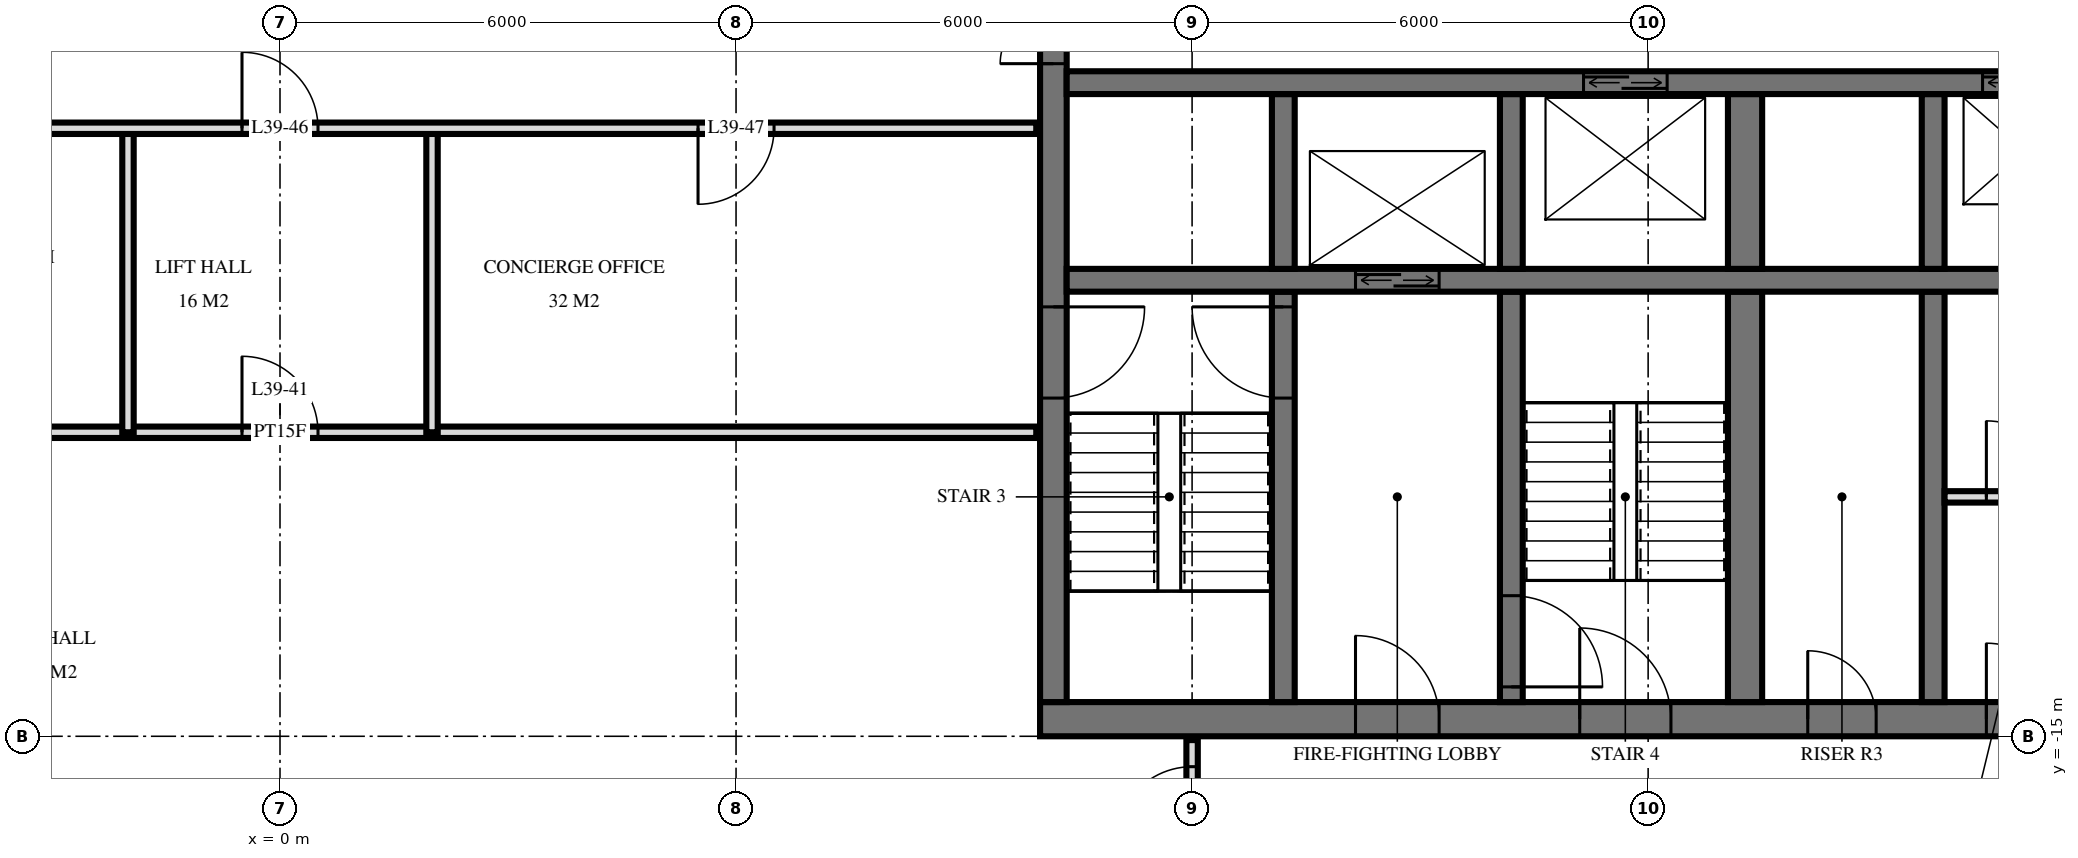
"""IFC4 building model, lengths in metres.
Left out: names, types, materials, properties, quantities, classifications, styles, units other than length and angle.
Written with IfcOpenShell. Run it as: python <this file> out.ifc"""

import sys

from ifc_helpers import new_model, si_unit, direction, frame, frame_2d, origin, place, context, subcontext, project, spatial, rectangle, extrude, element, fill, save


model = new_model("IFC4")
c1 = context("Model", 3, precision=1e-05, world=origin(), true_north=direction((0.0, 1.0)))
c2 = subcontext(c1, "Body", "Model", "MODEL_VIEW")
j1 = project(units=[si_unit("LENGTHUNIT", "METRE"), si_unit("PLANEANGLEUNIT", "RADIAN")], contexts=[c1])
p1 = place(None, origin())
s1 = spatial("IfcSite", under=j1, at=p1, CompositionType="ELEMENT")
p2 = place(p1, origin())
s2 = spatial("IfcBuilding", under=s1, at=p2, CompositionType="ELEMENT")
p3 = place(p2, frame((0.0, 0.0, 152.4)))
s3 = spatial("IfcBuildingStorey", under=s2, at=p3, CompositionType="ELEMENT", Elevation=152.4)
p4 = place(p3, frame((10.0, -14.775, 0.0), z_axis=(0.0, 0.0, 1.0), x_axis=(1.0, 0.0, 0.0)))
e1 = element("IfcWall", 1, at=p4, inside=s3, PredefinedType="SHEAR", context=c2, shape_type="SweptSolid", body=[
    extrude(rectangle(XDim=14.5, YDim=0.45, at=frame_2d((7.25, 0.0))), origin(), (0.0, 0.0, 1.0), 3.6),
])
p5 = place(p4, frame((7.1, 0.0, 0.0)))
e2 = element("IfcOpeningElement", 2, at=p5, cuts=e1, PredefinedType="OPENING", context=c2, shape_type="SweptSolid", body=[
    extrude(rectangle(XDim=1.2, YDim=2.1, at=frame_2d((0.6, 1.05))), frame((0.0, 0.235, 0.0), z_axis=(0.0, -1.0, 0.0), x_axis=(1.0, 0.0, 0.0)), (0.0, 0.0, 1.0), 0.47),
])
p6 = place(p4, frame((4.15, 0.0, 0.0)))
e3 = element("IfcOpeningElement", 3, at=p6, cuts=e1, PredefinedType="OPENING", context=c2, shape_type="SweptSolid", body=[
    extrude(rectangle(XDim=1.1, YDim=2.1, at=frame_2d((0.55, 1.05))), frame((0.0, 0.235, 0.0), z_axis=(0.0, -1.0, 0.0), x_axis=(1.0, 0.0, 0.0)), (0.0, 0.0, 1.0), 0.47),
])
p7 = place(p4, frame((10.1, 0.0, 0.0)))
e4 = element("IfcOpeningElement", 4, at=p7, cuts=e1, PredefinedType="OPENING", context=c2, shape_type="SweptSolid", body=[
    extrude(rectangle(XDim=0.9, YDim=2.1, at=frame_2d((0.45, 1.05))), frame((0.0, 0.235, 0.0), z_axis=(0.0, -1.0, 0.0), x_axis=(1.0, 0.0, 0.0)), (0.0, 0.0, 1.0), 0.47),
])
p8 = place(p4, frame((12.45, 0.0, 0.0)))
e5 = element("IfcOpeningElement", 5, at=p8, cuts=e1, PredefinedType="OPENING", context=c2, shape_type="SweptSolid", body=[
    extrude(rectangle(XDim=1.0, YDim=2.1, at=frame_2d((0.5, 1.05))), frame((0.0, 0.235, 0.0), z_axis=(0.0, -1.0, 0.0), x_axis=(1.0, 0.0, 0.0)), (0.0, 0.0, 1.0), 0.47),
])
p9 = place(p3, frame((10.175, -14.55, 0.0), z_axis=(0.0, 0.0, 1.0), x_axis=(0.0, 1.0, 0.0)))
e6 = element("IfcWall", 6, at=p9, inside=s3, PredefinedType="SHEAR", context=c2, shape_type="SweptSolid", body=[
    extrude(rectangle(XDim=14.1, YDim=0.35, at=frame_2d((7.05, 0.0))), origin(), (0.0, 0.0, 1.0), 3.6),
])
p10 = place(p9, frame((8.4, 0.0, 0.0)))
e7 = element("IfcOpeningElement", 7, at=p10, cuts=e6, PredefinedType="OPENING", context=c2, shape_type="SweptSolid", body=[
    extrude(rectangle(XDim=1.4, YDim=2.4, at=frame_2d((0.7, 1.2))), frame((0.0, 0.185, 0.0), z_axis=(0.0, -1.0, 0.0), x_axis=(1.0, 0.0, 0.0)), (0.0, 0.0, 1.0), 0.37),
])
p11 = place(p9, frame((10.0, 0.0, 0.0)))
e8 = element("IfcOpeningElement", 8, at=p11, cuts=e6, PredefinedType="OPENING", context=c2, shape_type="SweptSolid", body=[
    extrude(rectangle(XDim=1.4, YDim=2.4, at=frame_2d((0.7, 1.2))), frame((0.0, 0.185, 0.0), z_axis=(0.0, -1.0, 0.0), x_axis=(1.0, 0.0, 0.0)), (0.0, 0.0, 1.0), 0.37),
])
p12 = place(p9, frame((4.0, 0.0, 0.0)))
e9 = element("IfcOpeningElement", 9, at=p12, cuts=e6, PredefinedType="OPENING", context=c2, shape_type="SweptSolid", body=[
    extrude(rectangle(XDim=1.2, YDim=2.1, at=frame_2d((0.6, 1.05))), frame((0.0, 0.185, 0.0), z_axis=(0.0, -1.0, 0.0), x_axis=(1.0, 0.0, 0.0)), (0.0, 0.0, 1.0), 0.37),
])
p13 = place(p3, frame((10.35, -6.4, 0.0), z_axis=(0.0, 0.0, 1.0), x_axis=(1.0, 0.0, 0.0)))
e10 = element("IfcWall", 10, at=p13, inside=s3, PredefinedType="SHEAR", context=c2, shape_type="SweptSolid", body=[
    extrude(rectangle(XDim=13.7, YDim=0.3, at=frame_2d((6.85, 0.0))), origin(), (0.0, 0.0, 1.0), 3.6),
])
p14 = place(p13, frame((12.05, 0.0, 0.0)))
e11 = element("IfcOpeningElement", 11, at=p14, cuts=e10, PredefinedType="OPENING", context=c2, shape_type="SweptSolid", body=[
    extrude(rectangle(XDim=1.1, YDim=2.1, at=frame_2d((0.55, 1.05))), frame((0.0, 0.16, 0.0), z_axis=(0.0, -1.0, 0.0), x_axis=(1.0, 0.0, 0.0)), (0.0, 0.0, 1.0), 0.32),
])
p15 = place(p13, frame((6.8, 0.0, 0.0)))
e12 = element("IfcOpeningElement", 12, at=p15, cuts=e10, PredefinedType="OPENING", context=c2, shape_type="SweptSolid", body=[
    extrude(rectangle(XDim=1.1, YDim=2.1, at=frame_2d((0.55, 1.05))), frame((0.0, 0.16, 0.0), z_axis=(0.0, -1.0, 0.0), x_axis=(1.0, 0.0, 0.0)), (0.0, 0.0, 1.0), 0.32),
])
p16 = place(p3, frame((10.35, -9.0, 0.0), z_axis=(0.0, 0.0, 1.0), x_axis=(1.0, 0.0, 0.0)))
e13 = element("IfcWall", 13, at=p16, inside=s3, PredefinedType="SHEAR", context=c2, shape_type="SweptSolid", body=[
    extrude(rectangle(XDim=13.7, YDim=0.3, at=frame_2d((6.85, 0.0))), origin(), (0.0, 0.0, 1.0), 3.6),
])
p17 = place(p16, frame((3.8, 0.0, 0.0)))
e14 = element("IfcOpeningElement", 14, at=p17, cuts=e13, PredefinedType="OPENING", context=c2, shape_type="SweptSolid", body=[
    extrude(rectangle(XDim=1.1, YDim=2.1, at=frame_2d((0.55, 1.05))), frame((0.0, 0.16, 0.0), z_axis=(0.0, -1.0, 0.0), x_axis=(1.0, 0.0, 0.0)), (0.0, 0.0, 1.0), 0.32),
])
p18 = place(p3, frame((13.2, -8.85, 0.0), z_axis=(0.0, 0.0, 1.0), x_axis=(0.0, 1.0, 0.0)))
e15 = element("IfcWall", 15, at=p18, inside=s3, PredefinedType="SHEAR", context=c2, shape_type="SweptSolid", body=[
    extrude(rectangle(XDim=2.3, YDim=0.3, at=frame_2d((1.15, 0.0))), origin(), (0.0, 0.0, 1.0), 3.6),
])
p19 = place(p3, frame((13.2, -14.55, 0.0), z_axis=(0.0, 0.0, 1.0), x_axis=(0.0, 1.0, 0.0)))
e16 = element("IfcWall", 16, at=p19, inside=s3, PredefinedType="SHEAR", context=c2, shape_type="SweptSolid", body=[
    extrude(rectangle(XDim=5.4, YDim=0.3, at=frame_2d((2.7, 0.0))), origin(), (0.0, 0.0, 1.0), 3.6),
])
p20 = place(p19, frame((4.0, 0.0, 0.0)))
e17 = element("IfcOpeningElement", 17, at=p20, cuts=e16, PredefinedType="OPENING", context=c2, shape_type="SweptSolid", body=[
    extrude(rectangle(XDim=1.2, YDim=2.1, at=frame_2d((0.6, 1.05))), frame((0.0, 0.16, 0.0), z_axis=(0.0, -1.0, 0.0), x_axis=(1.0, 0.0, 0.0)), (0.0, 0.0, 1.0), 0.32),
])
p21 = place(p3, frame((16.2, -8.85, 0.0), z_axis=(0.0, 0.0, 1.0), x_axis=(0.0, 1.0, 0.0)))
e18 = element("IfcWall", 18, at=p21, inside=s3, PredefinedType="SHEAR", context=c2, shape_type="SweptSolid", body=[
    extrude(rectangle(XDim=2.3, YDim=0.3, at=frame_2d((1.15, 0.0))), origin(), (0.0, 0.0, 1.0), 3.6),
])
p22 = place(p3, frame((16.2, -14.55, 0.0), z_axis=(0.0, 0.0, 1.0), x_axis=(0.0, 1.0, 0.0)))
e19 = element("IfcWall", 19, at=p22, inside=s3, PredefinedType="SHEAR", context=c2, shape_type="SweptSolid", body=[
    extrude(rectangle(XDim=5.4, YDim=0.3, at=frame_2d((2.7, 0.0))), origin(), (0.0, 0.0, 1.0), 3.6),
])
p23 = place(p22, frame((0.2, 0.0, 0.0)))
e20 = element("IfcOpeningElement", 20, at=p23, cuts=e19, PredefinedType="OPENING", context=c2, shape_type="SweptSolid", body=[
    extrude(rectangle(XDim=1.2, YDim=2.1, at=frame_2d((0.6, 1.05))), frame((0.0, 0.16, 0.0), z_axis=(0.0, -1.0, 0.0), x_axis=(1.0, 0.0, 0.0)), (0.0, 0.0, 1.0), 0.32),
])
p24 = place(p3, frame((19.275, -8.85, 0.0), z_axis=(0.0, 0.0, 1.0), x_axis=(0.0, 1.0, 0.0)))
e21 = element("IfcWall", 21, at=p24, inside=s3, PredefinedType="SHEAR", context=c2, shape_type="SweptSolid", body=[
    extrude(rectangle(XDim=2.3, YDim=0.45, at=frame_2d((1.15, 0.0))), origin(), (0.0, 0.0, 1.0), 3.6),
])
p25 = place(p3, frame((19.275, -14.55, 0.0), z_axis=(0.0, 0.0, 1.0), x_axis=(0.0, 1.0, 0.0)))
e22 = element("IfcWall", 22, at=p25, inside=s3, PredefinedType="SHEAR", context=c2, shape_type="SweptSolid", body=[
    extrude(rectangle(XDim=5.4, YDim=0.45, at=frame_2d((2.7, 0.0))), origin(), (0.0, 0.0, 1.0), 3.6),
])
p26 = place(p3, frame((21.75, -8.85, 0.0), z_axis=(0.0, 0.0, 1.0), x_axis=(0.0, 1.0, 0.0)))
e23 = element("IfcWall", 23, at=p26, inside=s3, PredefinedType="SHEAR", context=c2, shape_type="SweptSolid", body=[
    extrude(rectangle(XDim=2.3, YDim=0.3, at=frame_2d((1.15, 0.0))), origin(), (0.0, 0.0, 1.0), 3.6),
])
p27 = place(p3, frame((21.75, -14.55, 0.0), z_axis=(0.0, 0.0, 1.0), x_axis=(0.0, 1.0, 0.0)))
e24 = element("IfcWall", 24, at=p27, inside=s3, PredefinedType="SHEAR", context=c2, shape_type="SweptSolid", body=[
    extrude(rectangle(XDim=5.4, YDim=0.3, at=frame_2d((2.7, 0.0))), origin(), (0.0, 0.0, 1.0), 3.6),
])
p28 = place(p3, frame((21.9, -11.85, 0.0), z_axis=(0.0, 0.0, 1.0), x_axis=(1.0, 0.0, 0.0)))
e25 = element("IfcWall", 25, at=p28, inside=s3, PredefinedType="PARTITIONING", context=c2, shape_type="SweptSolid", body=[
    extrude(rectangle(XDim=2.1, YDim=0.15, at=frame_2d((1.05, 0.0))), origin(), (0.0, 0.0, 1.0), 3.3),
])
p29 = place(p28, frame((0.55, 0.0, 0.0)))
e26 = element("IfcOpeningElement", 26, at=p29, cuts=e25, PredefinedType="OPENING", context=c2, shape_type="SweptSolid", body=[
    extrude(rectangle(XDim=1.0, YDim=2.1, at=frame_2d((0.5, 1.05))), frame((0.0, 0.085, 0.0), z_axis=(0.0, -1.0, 0.0), x_axis=(1.0, 0.0, 0.0)), (0.0, 0.0, 1.0), 0.17),
])
p30 = place(p3, frame((12.0, -16.8, 0.0), z_axis=(0.0, 0.0, 1.0), x_axis=(0.0, 1.0, 0.0)))
e27 = element("IfcWall", 27, at=p30, inside=s3, PredefinedType="PARTITIONING", context=c2, shape_type="SweptSolid", body=[
    extrude(rectangle(XDim=1.75, YDim=0.15, at=frame_2d((0.875, 0.0))), origin(), (0.0, 0.0, 1.0), 3.32),
])
p31 = place(p30, frame((0.4, 0.0, 0.0)))
e28 = element("IfcOpeningElement", 28, at=p31, cuts=e27, PredefinedType="OPENING", context=c2, shape_type="SweptSolid", body=[
    extrude(rectangle(XDim=1.0, YDim=2.1, at=frame_2d((0.5, 1.05))), frame((0.0, 0.085, 0.0), z_axis=(0.0, -1.0, 0.0), x_axis=(1.0, 0.0, 0.0)), (0.0, 0.0, 1.0), 0.17),
])
for number, where, z_axis, x_axis in (
    (29, (2.0, -11.0, 0.0), (0.0, 0.0, 1.0), (0.0, 1.0, 0.0)),
    (30, (-2.0, -11.0, 0.0), (0.0, 0.0, 1.0), (0.0, 1.0, 0.0)),
):
    element("IfcWall", number, at=place(p3, frame(where, z_axis=z_axis, x_axis=x_axis)), inside=s3, PredefinedType="PARTITIONING", context=c2, shape_type="SweptSolid", body=[
        extrude(rectangle(XDim=4.0, YDim=0.15, at=frame_2d((2.0, 0.0))), origin(), (0.0, 0.0, 1.0), 3.32),
    ])
p32 = place(p3, frame((-9.95, -11.0, 0.0), z_axis=(0.0, 0.0, 1.0), x_axis=(1.0, 0.0, 0.0)))
e31 = element("IfcWall", 31, at=p32, inside=s3, PredefinedType="PARTITIONING", context=c2, shape_type="SweptSolid", body=[
    extrude(rectangle(XDim=19.9, YDim=0.15, at=frame_2d((9.95, 0.0))), origin(), (0.0, 0.0, 1.0), 3.32),
])
p33 = place(p32, frame((9.45, 0.0, 0.0)))
e32 = element("IfcOpeningElement", 32, at=p33, cuts=e31, PredefinedType="OPENING", context=c2, shape_type="SweptSolid", body=[
    extrude(rectangle(XDim=1.0, YDim=2.1, at=frame_2d((0.5, 1.05))), frame((0.0, 0.085, 0.0), z_axis=(0.0, -1.0, 0.0), x_axis=(1.0, 0.0, 0.0)), (0.0, 0.0, 1.0), 0.17),
])
p34 = place(p32, frame((3.45, 0.0, 0.0)))
e33 = element("IfcOpeningElement", 33, at=p34, cuts=e31, PredefinedType="OPENING", context=c2, shape_type="SweptSolid", body=[
    extrude(rectangle(XDim=1.0, YDim=2.1, at=frame_2d((0.5, 1.05))), frame((0.0, 0.085, 0.0), z_axis=(0.0, -1.0, 0.0), x_axis=(1.0, 0.0, 0.0)), (0.0, 0.0, 1.0), 0.17),
])
p35 = place(p3, frame((-9.95, -7.0, 0.0), z_axis=(0.0, 0.0, 1.0), x_axis=(1.0, 0.0, 0.0)))
e34 = element("IfcWall", 34, at=p35, inside=s3, PredefinedType="PARTITIONING", context=c2, shape_type="SweptSolid", body=[
    extrude(rectangle(XDim=19.9, YDim=0.15, at=frame_2d((9.95, 0.0))), origin(), (0.0, 0.0, 1.0), 3.32),
])
p36 = place(p35, frame((9.45, 0.0, 0.0)))
e35 = element("IfcOpeningElement", 35, at=p36, cuts=e34, PredefinedType="OPENING", context=c2, shape_type="SweptSolid", body=[
    extrude(rectangle(XDim=1.0, YDim=2.1, at=frame_2d((0.5, 1.05))), frame((0.0, 0.085, 0.0), z_axis=(0.0, -1.0, 0.0), x_axis=(1.0, 0.0, 0.0)), (0.0, 0.0, 1.0), 0.17),
])
p37 = place(p35, frame((15.45, 0.0, 0.0)))
e36 = element("IfcOpeningElement", 36, at=p37, cuts=e34, PredefinedType="OPENING", context=c2, shape_type="SweptSolid", body=[
    extrude(rectangle(XDim=1.0, YDim=2.1, at=frame_2d((0.5, 1.05))), frame((0.0, 0.085, 0.0), z_axis=(0.0, -1.0, 0.0), x_axis=(1.0, 0.0, 0.0)), (0.0, 0.0, 1.0), 0.17),
])
p38 = place(p14, origin())
e37 = element("IfcDoor", 37, at=p38, inside=s3, OperationType="DOUBLE_DOOR_SLIDING", PredefinedType="USERDEFINED", context=c2, shape_type="SweptSolid", body=[
    extrude(rectangle(XDim=1.1, YDim=2.1, at=frame_2d((0.55, 1.05))), frame((0.0, 0.025, 0.0), z_axis=(0.0, -1.0, 0.0), x_axis=(1.0, 0.0, 0.0)), (0.0, 0.0, 1.0), 0.05),
])
fill(e11, e37)
p39 = place(p17, origin())
e38 = element("IfcDoor", 38, at=p39, inside=s3, OperationType="DOUBLE_DOOR_SLIDING", PredefinedType="USERDEFINED", context=c2, shape_type="SweptSolid", body=[
    extrude(rectangle(XDim=1.1, YDim=2.1, at=frame_2d((0.55, 1.05))), frame((0.0, 0.025, 0.0), z_axis=(0.0, -1.0, 0.0), x_axis=(1.0, 0.0, 0.0)), (0.0, 0.0, 1.0), 0.05),
])
fill(e14, e38)
p40 = place(p15, origin())
e39 = element("IfcDoor", 39, at=p40, inside=s3, OperationType="DOUBLE_DOOR_SLIDING", PredefinedType="USERDEFINED", context=c2, shape_type="SweptSolid", body=[
    extrude(rectangle(XDim=1.1, YDim=2.1, at=frame_2d((0.55, 1.05))), frame((0.0, 0.025, 0.0), z_axis=(0.0, -1.0, 0.0), x_axis=(1.0, 0.0, 0.0)), (0.0, 0.0, 1.0), 0.05),
])
fill(e12, e39)
p41 = place(p10, origin())
e40 = element("IfcDoor", 40, at=p41, inside=s3, OperationType="DOUBLE_DOOR_SINGLE_SWING", PredefinedType="DOOR", context=c2, shape_type="SweptSolid", body=[
    extrude(rectangle(XDim=1.4, YDim=2.4, at=frame_2d((0.7, 1.2))), frame((0.0, 0.025, 0.0), z_axis=(0.0, -1.0, 0.0), x_axis=(1.0, 0.0, 0.0)), (0.0, 0.0, 1.0), 0.05),
])
fill(e7, e40)
p42 = place(p12, frame((0.6, 0.0, 0.0), z_axis=(0.0, 0.0, 1.0), x_axis=(-1.0, 0.0, 0.0)))
e41 = element("IfcDoor", 41, at=p42, inside=s3, OperationType="SINGLE_SWING_RIGHT", PredefinedType="DOOR", context=c2, shape_type="SweptSolid", body=[
    extrude(rectangle(XDim=1.2, YDim=2.1, at=frame_2d((0.0, 1.05))), frame((0.0, -0.025, 0.0), z_axis=(0.0, 1.0, 0.0), x_axis=(-1.0, 0.0, 0.0)), (0.0, 0.0, 1.0), 0.05),
])
fill(e9, e41)
p43 = place(p5, origin())
e42 = element("IfcDoor", 42, at=p43, inside=s3, OperationType="SINGLE_SWING_RIGHT", PredefinedType="DOOR", context=c2, shape_type="SweptSolid", body=[
    extrude(rectangle(XDim=1.2, YDim=2.1, at=frame_2d((0.6, 1.05))), frame((0.0, 0.025, 0.0), z_axis=(0.0, -1.0, 0.0), x_axis=(1.0, 0.0, 0.0)), (0.0, 0.0, 1.0), 0.05),
])
fill(e2, e42)
p44 = place(p6, origin())
e43 = element("IfcDoor", 43, at=p44, inside=s3, OperationType="SINGLE_SWING_RIGHT", PredefinedType="DOOR", context=c2, shape_type="SweptSolid", body=[
    extrude(rectangle(XDim=1.1, YDim=2.1, at=frame_2d((0.55, 1.05))), frame((0.0, 0.025, 0.0), z_axis=(0.0, -1.0, 0.0), x_axis=(1.0, 0.0, 0.0)), (0.0, 0.0, 1.0), 0.05),
])
fill(e3, e43)
p45 = place(p7, origin())
e44 = element("IfcDoor", 44, at=p45, inside=s3, OperationType="SINGLE_SWING_RIGHT", PredefinedType="DOOR", context=c2, shape_type="SweptSolid", body=[
    extrude(rectangle(XDim=0.9, YDim=2.1, at=frame_2d((0.45, 1.05))), frame((0.0, 0.025, 0.0), z_axis=(0.0, -1.0, 0.0), x_axis=(1.0, 0.0, 0.0)), (0.0, 0.0, 1.0), 0.05),
])
fill(e4, e44)
p46 = place(p8, origin())
e45 = element("IfcDoor", 45, at=p46, inside=s3, OperationType="SINGLE_SWING_RIGHT", PredefinedType="DOOR", context=c2, shape_type="SweptSolid", body=[
    extrude(rectangle(XDim=1.0, YDim=2.1, at=frame_2d((0.5, 1.05))), frame((0.0, 0.025, 0.0), z_axis=(0.0, -1.0, 0.0), x_axis=(1.0, 0.0, 0.0)), (0.0, 0.0, 1.0), 0.05),
])
fill(e5, e45)
p47 = place(p20, origin())
e46 = element("IfcDoor", 46, at=p47, inside=s3, OperationType="SINGLE_SWING_LEFT", PredefinedType="DOOR", context=c2, shape_type="SweptSolid", body=[
    extrude(rectangle(XDim=1.2, YDim=2.1, at=frame_2d((0.6, 1.05))), frame((0.0, 0.025, 0.0), z_axis=(0.0, -1.0, 0.0), x_axis=(1.0, 0.0, 0.0)), (0.0, 0.0, 1.0), 0.05),
])
fill(e17, e46)
p48 = place(p23, frame((0.6, 0.0, 0.0), z_axis=(0.0, 0.0, 1.0), x_axis=(-1.0, 0.0, 0.0)))
e47 = element("IfcDoor", 47, at=p48, inside=s3, OperationType="SINGLE_SWING_LEFT", PredefinedType="DOOR", context=c2, shape_type="SweptSolid", body=[
    extrude(rectangle(XDim=1.2, YDim=2.1, at=frame_2d((0.0, 1.05))), frame((0.0, -0.025, 0.0), z_axis=(0.0, 1.0, 0.0), x_axis=(-1.0, 0.0, 0.0)), (0.0, 0.0, 1.0), 0.05),
])
fill(e20, e47)
p49 = place(p29, origin())
e48 = element("IfcDoor", 48, at=p49, inside=s3, OperationType="SINGLE_SWING_RIGHT", PredefinedType="DOOR", context=c2, shape_type="SweptSolid", body=[
    extrude(rectangle(XDim=1.0, YDim=2.1, at=frame_2d((0.5, 1.05))), frame((0.0, 0.025, 0.0), z_axis=(0.0, -1.0, 0.0), x_axis=(1.0, 0.0, 0.0)), (0.0, 0.0, 1.0), 0.05),
])
fill(e26, e48)
p50 = place(p31, origin())
e49 = element("IfcDoor", 49, at=p50, inside=s3, OperationType="SINGLE_SWING_RIGHT", PredefinedType="DOOR", context=c2, shape_type="SweptSolid", body=[
    extrude(rectangle(XDim=1.0, YDim=2.1, at=frame_2d((0.5, 1.05))), frame((0.0, 0.025, 0.0), z_axis=(0.0, -1.0, 0.0), x_axis=(1.0, 0.0, 0.0)), (0.0, 0.0, 1.0), 0.05),
])
fill(e28, e49)
p51 = place(p33, origin())
e50 = element("IfcDoor", 50, at=p51, inside=s3, OperationType="SINGLE_SWING_RIGHT", PredefinedType="DOOR", context=c2, shape_type="SweptSolid", body=[
    extrude(rectangle(XDim=1.0, YDim=2.1, at=frame_2d((0.5, 1.05))), frame((0.0, 0.025, 0.0), z_axis=(0.0, -1.0, 0.0), x_axis=(1.0, 0.0, 0.0)), (0.0, 0.0, 1.0), 0.05),
])
fill(e32, e50)
p52 = place(p36, origin())
e51 = element("IfcDoor", 51, at=p52, inside=s3, OperationType="SINGLE_SWING_RIGHT", PredefinedType="DOOR", context=c2, shape_type="SweptSolid", body=[
    extrude(rectangle(XDim=1.0, YDim=2.1, at=frame_2d((0.5, 1.05))), frame((0.0, 0.025, 0.0), z_axis=(0.0, -1.0, 0.0), x_axis=(1.0, 0.0, 0.0)), (0.0, 0.0, 1.0), 0.05),
])
fill(e35, e51)
p53 = place(p37, frame((0.5, 0.0, 0.0), z_axis=(0.0, 0.0, 1.0), x_axis=(-1.0, 0.0, 0.0)))
e52 = element("IfcDoor", 52, at=p53, inside=s3, OperationType="SINGLE_SWING_LEFT", PredefinedType="DOOR", context=c2, shape_type="SweptSolid", body=[
    extrude(rectangle(XDim=1.0, YDim=2.1, at=frame_2d((0.0, 1.05))), frame((0.0, -0.025, 0.0), z_axis=(0.0, 1.0, 0.0), x_axis=(-1.0, 0.0, 0.0)), (0.0, 0.0, 1.0), 0.05),
])
fill(e36, e52)
save(model, sys.argv[1])
